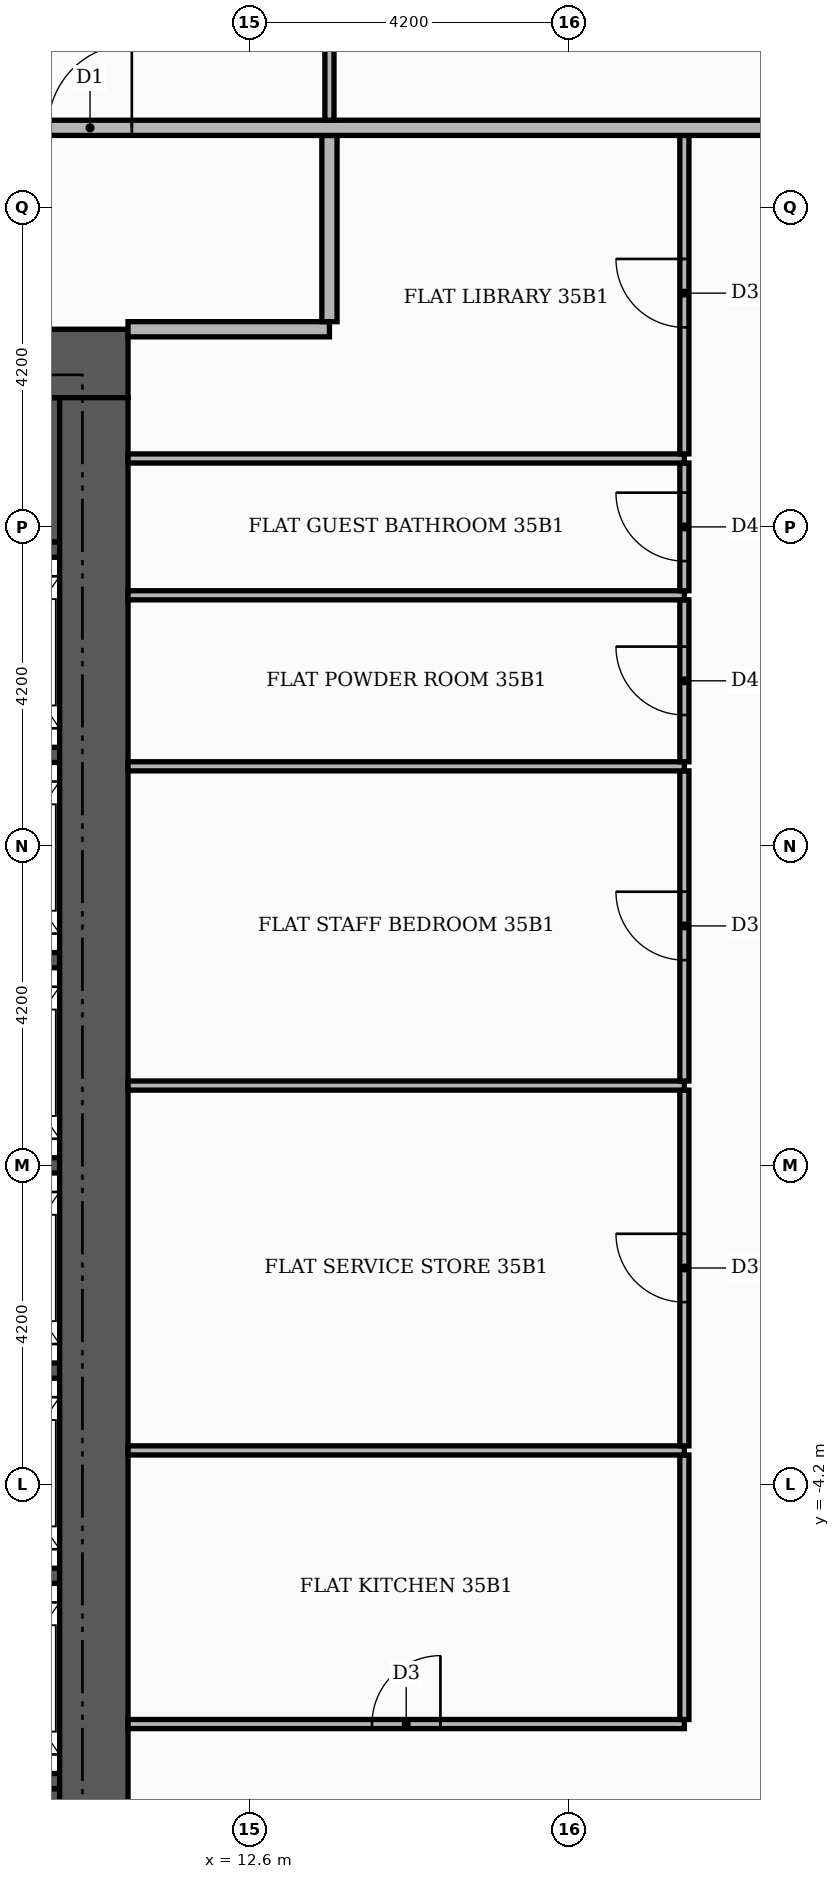
"""IFC4 building model, lengths in metres.
Left out: names, types, materials, properties, quantities, classifications, styles, units other than length and angle.
Written with IfcOpenShell. Run it as: python <this file> out.ifc"""

import sys

from ifc_helpers import new_model, si_unit, direction, frame, frame_2d, origin, place, context, subcontext, project, spatial, rectangle, extrude, element, fill, save


model = new_model("IFC4")
c1 = context("Model", 3, precision=1e-05, world=origin(), true_north=direction((0.0, 1.0)))
c2 = subcontext(c1, "Body", "Model", "MODEL_VIEW")
j1 = project(units=[si_unit("LENGTHUNIT", "METRE"), si_unit("PLANEANGLEUNIT", "RADIAN")], contexts=[c1])
p1 = place(None, origin())
s1 = spatial("IfcSite", under=j1, at=p1, CompositionType="ELEMENT")
p2 = place(p1, origin())
s2 = spatial("IfcBuilding", under=s1, at=p2, CompositionType="ELEMENT")
p3 = place(p2, frame((0.0, 0.0, 149.4)))
s3 = spatial("IfcBuildingStorey", under=s2, at=p3, CompositionType="ELEMENT", Elevation=149.4)
for number, where, z_axis, x_axis in (
    (1, (5.5, -9.15, 0.0), (0.0, 0.0, 1.0), (1.0, 0.0, 0.0)),
    (2, (5.5, 9.15, 0.0), (0.0, 0.0, 1.0), (1.0, 0.0, 0.0)),
):
    element("IfcWall", number, at=place(p3, frame(where, z_axis=z_axis, x_axis=x_axis)), inside=s3, PredefinedType="SHEAR", context=c2, shape_type="SweptSolid", body=[
        extrude(rectangle(XDim=4.6, YDim=1.9, at=frame_2d((2.3, 0.0))), origin(), (0.0, 0.0, 1.0), 3.48),
    ])
for number, where, z_axis, x_axis in (
    (3, (8.1, -8.1, 0.0), (0.0, 0.0, 1.0), (1.0, 0.0, 0.0)),
    (4, (8.1, -5.4, 0.0), (0.0, 0.0, 1.0), (1.0, 0.0, 0.0)),
    (5, (8.1, -2.7, 0.0), (0.0, 0.0, 1.0), (1.0, 0.0, 0.0)),
    (6, (8.1, 0.0, 0.0), (0.0, 0.0, 1.0), (1.0, 0.0, 0.0)),
    (7, (8.1, 2.7, 0.0), (0.0, 0.0, 1.0), (1.0, 0.0, 0.0)),
    (8, (8.1, 5.4, 0.0), (0.0, 0.0, 1.0), (1.0, 0.0, 0.0)),
    (9, (8.1, 8.1, 0.0), (0.0, 0.0, 1.0), (1.0, 0.0, 0.0)),
):
    element("IfcWall", number, at=place(p3, frame(where, z_axis=z_axis, x_axis=x_axis)), inside=s3, PredefinedType="SHEAR", context=c2, shape_type="SweptSolid", body=[
        extrude(rectangle(XDim=2.0, YDim=0.2, at=frame_2d((1.0, 0.0))), origin(), (0.0, 0.0, 1.0), 3.48),
    ])
p4 = place(p3, frame((-11.0, 10.55, 0.0), z_axis=(0.0, 0.0, 1.0), x_axis=(1.0, 0.0, 0.0)))
e10 = element("IfcWall", 10, at=p4, inside=s3, PredefinedType="SHEAR", context=c2, shape_type="SweptSolid", body=[
    extrude(rectangle(XDim=22.0, YDim=0.9, at=frame_2d((11.0, 0.0))), origin(), (0.0, 0.0, 1.0), 3.48),
])
p5 = place(p4, frame((13.3, 0.0, 0.0)))
e11 = element("IfcOpeningElement", 11, at=p5, cuts=e10, PredefinedType="OPENING", context=c2, shape_type="SweptSolid", body=[
    extrude(rectangle(XDim=1.8, YDim=2.2, at=frame_2d((0.9, 1.1))), frame((0.0, 0.46, 0.0), z_axis=(0.0, -1.0, 0.0), x_axis=(1.0, 0.0, 0.0)), (0.0, 0.0, 1.0), 0.92),
])
p6 = place(p3, frame((10.55, -10.1, 0.0), z_axis=(0.0, 0.0, 1.0), x_axis=(0.0, 1.0, 0.0)))
e12 = element("IfcWall", 12, at=p6, inside=s3, PredefinedType="SHEAR", context=c2, shape_type="SweptSolid", body=[
    extrude(rectangle(XDim=20.2, YDim=0.9, at=frame_2d((10.1, 0.0))), origin(), (0.0, 0.0, 1.0), 3.48),
])
p7 = place(p3, frame((11.0, -7.35, 0.0), z_axis=(0.0, 0.0, 1.0), x_axis=(1.0, 0.0, 0.0)))
e13 = element("IfcWall", 13, at=p7, inside=s3, PredefinedType="PARTITIONING", context=c2, shape_type="SweptSolid", body=[
    extrude(rectangle(XDim=7.32, YDim=0.12, at=frame_2d((3.66, 0.0))), origin(), (0.0, 0.0, 1.0), 3.48),
])
p8 = place(p7, frame((3.21, 0.0, 0.0)))
e14 = element("IfcOpeningElement", 14, at=p8, cuts=e13, PredefinedType="OPENING", context=c2, shape_type="SweptSolid", body=[
    extrude(rectangle(XDim=0.9, YDim=2.1, at=frame_2d((0.45, 1.05))), frame((0.0, 0.07, 0.0), z_axis=(0.0, -1.0, 0.0), x_axis=(1.0, 0.0, 0.0)), (0.0, 0.0, 1.0), 0.14),
])
p9 = place(p3, frame((18.32, -7.29, 0.0), z_axis=(0.0, 0.0, 1.0), x_axis=(0.0, 1.0, 0.0)))
e15 = element("IfcWall", 15, at=p9, inside=s3, PredefinedType="PARTITIONING", context=c2, shape_type="SweptSolid", body=[
    extrude(rectangle(XDim=3.48, YDim=0.12, at=frame_2d((1.74, 0.0))), origin(), (0.0, 0.0, 1.0), 3.48),
])
p10 = place(p3, frame((11.0, -3.75, 0.0), z_axis=(0.0, 0.0, 1.0), x_axis=(1.0, 0.0, 0.0)))
e16 = element("IfcWall", 16, at=p10, inside=s3, PredefinedType="PARTITIONING", context=c2, shape_type="SweptSolid", body=[
    extrude(rectangle(XDim=7.32, YDim=0.12, at=frame_2d((3.66, 0.0))), origin(), (0.0, 0.0, 1.0), 3.48),
])
p11 = place(p3, frame((18.32, -3.69, 0.0), z_axis=(0.0, 0.0, 1.0), x_axis=(0.0, 1.0, 0.0)))
e17 = element("IfcWall", 17, at=p11, inside=s3, PredefinedType="PARTITIONING", context=c2, shape_type="SweptSolid", body=[
    extrude(rectangle(XDim=4.68, YDim=0.12, at=frame_2d((2.34, 0.0))), origin(), (0.0, 0.0, 1.0), 3.48),
])
p12 = place(p11, frame((1.89, 0.0, 0.0)))
e18 = element("IfcOpeningElement", 18, at=p12, cuts=e17, PredefinedType="OPENING", context=c2, shape_type="SweptSolid", body=[
    extrude(rectangle(XDim=0.9, YDim=2.1, at=frame_2d((0.45, 1.05))), frame((0.0, 0.07, 0.0), z_axis=(0.0, -1.0, 0.0), x_axis=(1.0, 0.0, 0.0)), (0.0, 0.0, 1.0), 0.14),
])
p13 = place(p3, frame((11.0, 1.05, 0.0), z_axis=(0.0, 0.0, 1.0), x_axis=(1.0, 0.0, 0.0)))
e19 = element("IfcWall", 19, at=p13, inside=s3, PredefinedType="PARTITIONING", context=c2, shape_type="SweptSolid", body=[
    extrude(rectangle(XDim=7.32, YDim=0.12, at=frame_2d((3.66, 0.0))), origin(), (0.0, 0.0, 1.0), 3.48),
])
p14 = place(p3, frame((18.32, 1.11, 0.0), z_axis=(0.0, 0.0, 1.0), x_axis=(0.0, 1.0, 0.0)))
e20 = element("IfcWall", 20, at=p14, inside=s3, PredefinedType="PARTITIONING", context=c2, shape_type="SweptSolid", body=[
    extrude(rectangle(XDim=4.08, YDim=0.12, at=frame_2d((2.04, 0.0))), origin(), (0.0, 0.0, 1.0), 3.48),
])
p15 = place(p14, frame((1.59, 0.0, 0.0)))
e21 = element("IfcOpeningElement", 21, at=p15, cuts=e20, PredefinedType="OPENING", context=c2, shape_type="SweptSolid", body=[
    extrude(rectangle(XDim=0.9, YDim=2.1, at=frame_2d((0.45, 1.05))), frame((0.0, 0.07, 0.0), z_axis=(0.0, -1.0, 0.0), x_axis=(1.0, 0.0, 0.0)), (0.0, 0.0, 1.0), 0.14),
])
p16 = place(p3, frame((11.0, 5.25, 0.0), z_axis=(0.0, 0.0, 1.0), x_axis=(1.0, 0.0, 0.0)))
e22 = element("IfcWall", 22, at=p16, inside=s3, PredefinedType="PARTITIONING", context=c2, shape_type="SweptSolid", body=[
    extrude(rectangle(XDim=7.32, YDim=0.12, at=frame_2d((3.66, 0.0))), origin(), (0.0, 0.0, 1.0), 3.48),
])
p17 = place(p3, frame((18.32, 5.31, 0.0), z_axis=(0.0, 0.0, 1.0), x_axis=(0.0, 1.0, 0.0)))
e23 = element("IfcWall", 23, at=p17, inside=s3, PredefinedType="PARTITIONING", context=c2, shape_type="SweptSolid", body=[
    extrude(rectangle(XDim=2.13, YDim=0.12, at=frame_2d((1.065, 0.0))), origin(), (0.0, 0.0, 1.0), 3.48),
])
p18 = place(p17, frame((0.615, 0.0, 0.0)))
e24 = element("IfcOpeningElement", 24, at=p18, cuts=e23, PredefinedType="OPENING", context=c2, shape_type="SweptSolid", body=[
    extrude(rectangle(XDim=0.9, YDim=2.1, at=frame_2d((0.45, 1.05))), frame((0.0, 0.07, 0.0), z_axis=(0.0, -1.0, 0.0), x_axis=(1.0, 0.0, 0.0)), (0.0, 0.0, 1.0), 0.14),
])
p19 = place(p3, frame((11.0, 7.5, 0.0), z_axis=(0.0, 0.0, 1.0), x_axis=(1.0, 0.0, 0.0)))
e25 = element("IfcWall", 25, at=p19, inside=s3, PredefinedType="PARTITIONING", context=c2, shape_type="SweptSolid", body=[
    extrude(rectangle(XDim=7.32, YDim=0.12, at=frame_2d((3.66, 0.0))), origin(), (0.0, 0.0, 1.0), 3.48),
])
p20 = place(p3, frame((18.32, 7.56, 0.0), z_axis=(0.0, 0.0, 1.0), x_axis=(0.0, 1.0, 0.0)))
e26 = element("IfcWall", 26, at=p20, inside=s3, PredefinedType="PARTITIONING", context=c2, shape_type="SweptSolid", body=[
    extrude(rectangle(XDim=1.68, YDim=0.12, at=frame_2d((0.84, 0.0))), origin(), (0.0, 0.0, 1.0), 3.48),
])
p21 = place(p20, frame((0.39, 0.0, 0.0)))
e27 = element("IfcOpeningElement", 27, at=p21, cuts=e26, PredefinedType="OPENING", context=c2, shape_type="SweptSolid", body=[
    extrude(rectangle(XDim=0.9, YDim=2.1, at=frame_2d((0.45, 1.05))), frame((0.0, 0.07, 0.0), z_axis=(0.0, -1.0, 0.0), x_axis=(1.0, 0.0, 0.0)), (0.0, 0.0, 1.0), 0.14),
])
p22 = place(p3, frame((11.0, 9.3, 0.0), z_axis=(0.0, 0.0, 1.0), x_axis=(1.0, 0.0, 0.0)))
e28 = element("IfcWall", 28, at=p22, inside=s3, PredefinedType="PARTITIONING", context=c2, shape_type="SweptSolid", body=[
    extrude(rectangle(XDim=7.32, YDim=0.12, at=frame_2d((3.66, 0.0))), origin(), (0.0, 0.0, 1.0), 3.48),
])
p23 = place(p3, frame((18.32, 9.36, 0.0), z_axis=(0.0, 0.0, 1.0), x_axis=(0.0, 1.0, 0.0)))
e29 = element("IfcWall", 29, at=p23, inside=s3, PredefinedType="PARTITIONING", context=c2, shape_type="SweptSolid", body=[
    extrude(rectangle(XDim=4.19, YDim=0.12, at=frame_2d((2.095, 0.0))), origin(), (0.0, 0.0, 1.0), 3.48),
])
p24 = place(p23, frame((1.665, 0.0, 0.0)))
e30 = element("IfcOpeningElement", 30, at=p24, cuts=e29, PredefinedType="OPENING", context=c2, shape_type="SweptSolid", body=[
    extrude(rectangle(XDim=0.9, YDim=2.1, at=frame_2d((0.45, 1.05))), frame((0.0, 0.07, 0.0), z_axis=(0.0, -1.0, 0.0), x_axis=(1.0, 0.0, 0.0)), (0.0, 0.0, 1.0), 0.14),
])
p25 = place(p3, frame((11.0, 11.0, 0.0), z_axis=(0.0, 0.0, 1.0), x_axis=(1.0, 0.0, 0.0)))
e31 = element("IfcWall", 31, at=p25, inside=s3, PredefinedType="PARTITIONING", context=c2, shape_type="SweptSolid", body=[
    extrude(rectangle(XDim=2.65, YDim=0.2, at=frame_2d((1.325, 0.0))), origin(), (0.0, 0.0, 1.0), 3.48),
])
p26 = place(p3, frame((13.65, 11.1, 0.0), z_axis=(0.0, 0.0, 1.0), x_axis=(0.0, 1.0, 0.0)))
e32 = element("IfcWall", 32, at=p26, inside=s3, PredefinedType="PARTITIONING", context=c2, shape_type="SweptSolid", body=[
    extrude(rectangle(XDim=2.45, YDim=0.2, at=frame_2d((1.225, 0.0))), origin(), (0.0, 0.0, 1.0), 3.48),
])
p27 = place(p3, frame((-13.65, 13.65, 0.0), z_axis=(0.0, 0.0, 1.0), x_axis=(1.0, 0.0, 0.0)))
e33 = element("IfcWall", 33, at=p27, inside=s3, PredefinedType="PARTITIONING", context=c2, shape_type="SweptSolid", body=[
    extrude(rectangle(XDim=39.07, YDim=0.2, at=frame_2d((19.535, 0.0))), origin(), (0.0, 0.0, 1.0), 3.48),
])
p28 = place(p27, frame((23.6, 0.0, 0.0)))
e34 = element("IfcOpeningElement", 34, at=p28, cuts=e33, PredefinedType="OPENING", context=c2, shape_type="SweptSolid", body=[
    extrude(rectangle(XDim=1.1, YDim=2.4, at=frame_2d((0.55, 1.2))), frame((0.0, 0.11, 0.0), z_axis=(0.0, -1.0, 0.0), x_axis=(1.0, 0.0, 0.0)), (0.0, 0.0, 1.0), 0.22),
])
p29 = place(p3, frame((13.65, 13.75, 0.0), z_axis=(0.0, 0.0, 1.0), x_axis=(0.0, 1.0, 0.0)))
e35 = element("IfcWall", 35, at=p29, inside=s3, PredefinedType="PARTITIONING", context=c2, shape_type="SweptSolid", body=[
    extrude(rectangle(XDim=6.61, YDim=0.12, at=frame_2d((3.305, 0.0))), origin(), (0.0, 0.0, 1.0), 3.48),
])
p30 = place(p29, frame((2.835, 0.0, 0.0)))
e36 = element("IfcOpeningElement", 36, at=p30, cuts=e35, PredefinedType="OPENING", context=c2, shape_type="SweptSolid", body=[
    extrude(rectangle(XDim=0.9, YDim=2.1, at=frame_2d((0.45, 1.05))), frame((0.0, 0.07, 0.0), z_axis=(0.0, -1.0, 0.0), x_axis=(1.0, 0.0, 0.0)), (0.0, 0.0, 1.0), 0.14),
])
p31 = place(p8, origin())
e37 = element("IfcDoor", 37, at=p31, inside=s3, OperationType="SINGLE_SWING_RIGHT", PredefinedType="DOOR", context=c2, shape_type="SweptSolid", body=[
    extrude(rectangle(XDim=0.9, YDim=2.1, at=frame_2d((0.45, 1.05))), frame((0.0, 0.025, 0.0), z_axis=(0.0, -1.0, 0.0), x_axis=(1.0, 0.0, 0.0)), (0.0, 0.0, 1.0), 0.05),
])
fill(e14, e37)
p32 = place(p12, origin())
e38 = element("IfcDoor", 38, at=p32, inside=s3, OperationType="SINGLE_SWING_RIGHT", PredefinedType="DOOR", context=c2, shape_type="SweptSolid", body=[
    extrude(rectangle(XDim=0.9, YDim=2.1, at=frame_2d((0.45, 1.05))), frame((0.0, 0.025, 0.0), z_axis=(0.0, -1.0, 0.0), x_axis=(1.0, 0.0, 0.0)), (0.0, 0.0, 1.0), 0.05),
])
fill(e18, e38)
p33 = place(p15, origin())
e39 = element("IfcDoor", 39, at=p33, inside=s3, OperationType="SINGLE_SWING_RIGHT", PredefinedType="DOOR", context=c2, shape_type="SweptSolid", body=[
    extrude(rectangle(XDim=0.9, YDim=2.1, at=frame_2d((0.45, 1.05))), frame((0.0, 0.025, 0.0), z_axis=(0.0, -1.0, 0.0), x_axis=(1.0, 0.0, 0.0)), (0.0, 0.0, 1.0), 0.05),
])
fill(e21, e39)
p34 = place(p18, origin())
e40 = element("IfcDoor", 40, at=p34, inside=s3, OperationType="SINGLE_SWING_RIGHT", PredefinedType="DOOR", context=c2, shape_type="SweptSolid", body=[
    extrude(rectangle(XDim=0.9, YDim=2.1, at=frame_2d((0.45, 1.05))), frame((0.0, 0.025, 0.0), z_axis=(0.0, -1.0, 0.0), x_axis=(1.0, 0.0, 0.0)), (0.0, 0.0, 1.0), 0.05),
])
fill(e24, e40)
p35 = place(p21, origin())
e41 = element("IfcDoor", 41, at=p35, inside=s3, OperationType="SINGLE_SWING_RIGHT", PredefinedType="DOOR", context=c2, shape_type="SweptSolid", body=[
    extrude(rectangle(XDim=0.9, YDim=2.1, at=frame_2d((0.45, 1.05))), frame((0.0, 0.025, 0.0), z_axis=(0.0, -1.0, 0.0), x_axis=(1.0, 0.0, 0.0)), (0.0, 0.0, 1.0), 0.05),
])
fill(e27, e41)
p36 = place(p24, origin())
e42 = element("IfcDoor", 42, at=p36, inside=s3, OperationType="SINGLE_SWING_RIGHT", PredefinedType="DOOR", context=c2, shape_type="SweptSolid", body=[
    extrude(rectangle(XDim=0.9, YDim=2.1, at=frame_2d((0.45, 1.05))), frame((0.0, 0.025, 0.0), z_axis=(0.0, -1.0, 0.0), x_axis=(1.0, 0.0, 0.0)), (0.0, 0.0, 1.0), 0.05),
])
fill(e30, e42)
p37 = place(p28, origin())
e43 = element("IfcDoor", 43, at=p37, inside=s3, OperationType="SINGLE_SWING_RIGHT", PredefinedType="DOOR", context=c2, shape_type="SweptSolid", body=[
    extrude(rectangle(XDim=1.1, YDim=2.4, at=frame_2d((0.55, 1.2))), frame((0.0, 0.025, 0.0), z_axis=(0.0, -1.0, 0.0), x_axis=(1.0, 0.0, 0.0)), (0.0, 0.0, 1.0), 0.05),
])
fill(e34, e43)
save(model, sys.argv[1])
